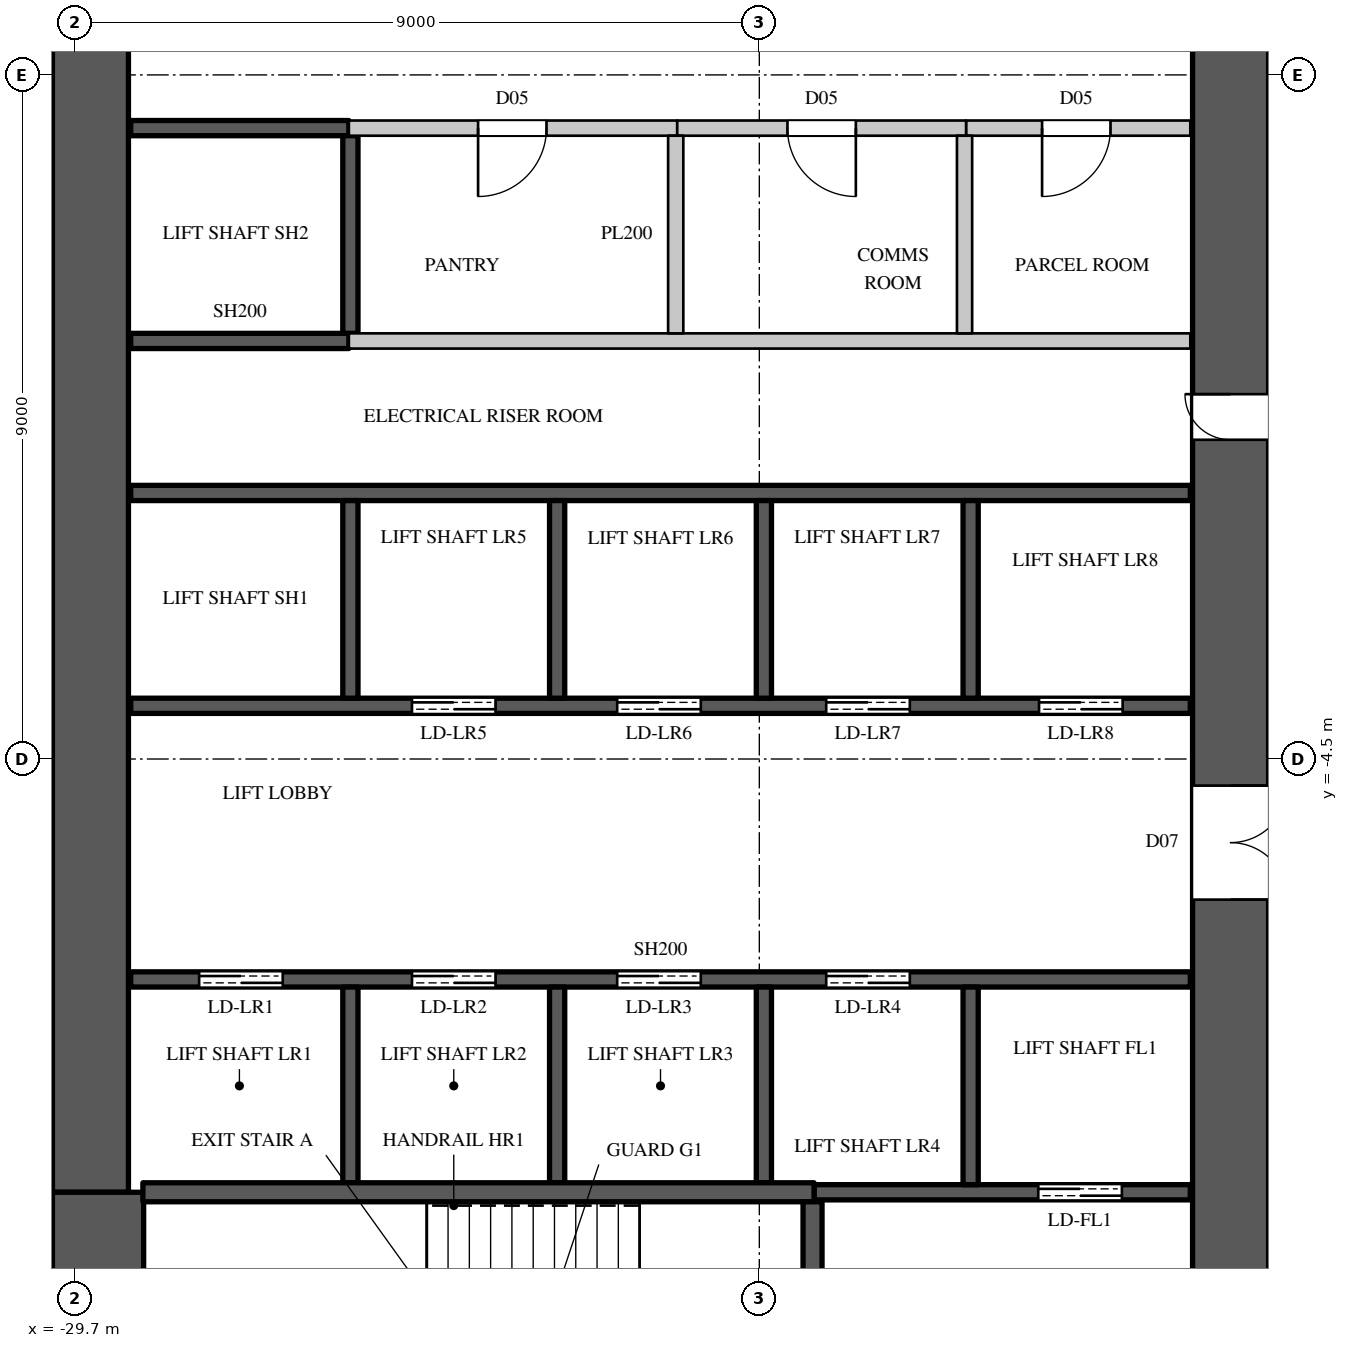
"""IFC4 building model, lengths in metres.
Left out: names, types, materials, properties, quantities, classifications, styles, units other than length and angle.
Written with IfcOpenShell. Run it as: python <this file> out.ifc"""

import sys

from ifc_helpers import new_model, si_unit, direction, frame, frame_2d, origin, place, context, subcontext, project, spatial, rectangle, extrude, element, fill, save


model = new_model("IFC4")
c1 = context("Model", 3, precision=1e-05, world=origin(), true_north=direction((0.0, 1.0)))
c2 = subcontext(c1, "Body", "Model", "MODEL_VIEW")
j1 = project(units=[si_unit("LENGTHUNIT", "METRE"), si_unit("PLANEANGLEUNIT", "RADIAN")], contexts=[c1])
p1 = place(None, origin())
s1 = spatial("IfcSite", under=j1, at=p1, CompositionType="ELEMENT")
p2 = place(p1, origin())
s2 = spatial("IfcBuilding", under=s1, at=p2, CompositionType="ELEMENT")
p3 = place(p2, frame((0.0, 0.0, 87.9)))
s3 = spatial("IfcBuildingStorey", under=s2, at=p3, CompositionType="ELEMENT", Elevation=87.9)
p4 = place(p3, frame((-14.5, -14.8, 0.0), z_axis=(0.0, 0.0, 1.0), x_axis=(0.0, 1.0, 0.0)))
e1 = element("IfcWall", 1, at=p4, inside=s3, PredefinedType="SHEAR", context=c2, shape_type="SweptSolid", body=[
    extrude(rectangle(XDim=29.6, YDim=1.0, at=frame_2d((14.8, 0.0))), origin(), (0.0, 0.0, 1.0), 3.6),
])
p5 = place(p4, frame((8.45, 0.0, 0.0)))
e2 = element("IfcOpeningElement", 2, at=p5, cuts=e1, PredefinedType="OPENING", context=c2, shape_type="SweptSolid", body=[
    extrude(rectangle(XDim=1.5, YDim=2.4, at=frame_2d((0.75, 1.2))), frame((0.0, 0.51, 0.0), z_axis=(0.0, -1.0, 0.0), x_axis=(1.0, 0.0, 0.0)), (0.0, 0.0, 1.0), 1.02),
])
p6 = place(p4, frame((19.65, 0.0, 0.0)))
e3 = element("IfcOpeningElement", 3, at=p6, cuts=e1, PredefinedType="OPENING", context=c2, shape_type="SweptSolid", body=[
    extrude(rectangle(XDim=1.5, YDim=2.4, at=frame_2d((0.75, 1.2))), frame((0.0, 0.51, 0.0), z_axis=(0.0, -1.0, 0.0), x_axis=(1.0, 0.0, 0.0)), (0.0, 0.0, 1.0), 1.02),
])
p7 = place(p4, frame((14.5, 0.0, 0.0)))
e4 = element("IfcOpeningElement", 4, at=p7, cuts=e1, PredefinedType="OPENING", context=c2, shape_type="SweptSolid", body=[
    extrude(rectangle(XDim=0.6, YDim=2.0, at=frame_2d((0.3, 1.0))), frame((0.0, 0.51, 0.0), z_axis=(0.0, -1.0, 0.0), x_axis=(1.0, 0.0, 0.0)), (0.0, 0.0, 1.0), 1.02),
])
p8 = place(p3, frame((-29.5, -10.2, 0.0), z_axis=(0.0, 0.0, 1.0), x_axis=(0.0, 1.0, 0.0)))
e5 = element("IfcWall", 5, at=p8, inside=s3, PredefinedType="SHEAR", context=c2, shape_type="SweptSolid", body=[
    extrude(rectangle(XDim=20.4, YDim=1.0, at=frame_2d((10.2, 0.0))), origin(), (0.0, 0.0, 1.0), 3.6),
])
p9 = place(p3, frame((-29.4, -14.8, 0.0), z_axis=(0.0, 0.0, 1.0), x_axis=(0.0, 1.0, 0.0)))
e6 = element("IfcWall", 6, at=p9, inside=s3, PredefinedType="SHEAR", context=c2, shape_type="SweptSolid", body=[
    extrude(rectangle(XDim=4.6, YDim=1.2, at=frame_2d((2.3, 0.0))), origin(), (0.0, 0.0, 1.0), 3.6),
])
p10 = place(p3, frame((-26.1, 3.8, 0.0), z_axis=(0.0, 0.0, 1.0), x_axis=(1.0, 0.0, 0.0)))
e7 = element("IfcWall", 7, at=p10, inside=s3, PredefinedType="PARTITIONING", context=c2, shape_type="SweptSolid", body=[
    extrude(rectangle(XDim=4.32, YDim=0.2, at=frame_2d((2.16, 0.0))), origin(), (0.0, 0.0, 1.0), 3.3),
])
p11 = place(p10, frame((1.7, 0.0, 0.0)))
e8 = element("IfcOpeningElement", 8, at=p11, cuts=e7, PredefinedType="OPENING", context=c2, shape_type="SweptSolid", body=[
    extrude(rectangle(XDim=0.9, YDim=2.2, at=frame_2d((0.45, 1.1))), frame((0.0, 0.11, 0.0), z_axis=(0.0, -1.0, 0.0), x_axis=(1.0, 0.0, 0.0)), (0.0, 0.0, 1.0), 0.22),
])
p12 = place(p3, frame((-17.98, 3.8, 0.0), z_axis=(0.0, 0.0, 1.0), x_axis=(1.0, 0.0, 0.0)))
e9 = element("IfcWall", 9, at=p12, inside=s3, PredefinedType="PARTITIONING", context=c2, shape_type="SweptSolid", body=[
    extrude(rectangle(XDim=2.95, YDim=0.2, at=frame_2d((1.475, 0.0))), origin(), (0.0, 0.0, 1.0), 3.3),
])
p13 = place(p12, frame((1.0, 0.0, 0.0)))
e10 = element("IfcOpeningElement", 10, at=p13, cuts=e9, PredefinedType="OPENING", context=c2, shape_type="SweptSolid", body=[
    extrude(rectangle(XDim=0.9, YDim=2.2, at=frame_2d((0.45, 1.1))), frame((0.0, 0.11, 0.0), z_axis=(0.0, -1.0, 0.0), x_axis=(1.0, 0.0, 0.0)), (0.0, 0.0, 1.0), 0.22),
])
p14 = place(p3, frame((-26.1, 1.0, 0.0), z_axis=(0.0, 0.0, 1.0), x_axis=(1.0, 0.0, 0.0)))
e11 = element("IfcWall", 11, at=p14, inside=s3, PredefinedType="PARTITIONING", context=c2, shape_type="SweptSolid", body=[
    extrude(rectangle(XDim=11.07, YDim=0.2, at=frame_2d((5.535, 0.0))), origin(), (0.0, 0.0, 1.0), 3.3),
])
p15 = place(p3, frame((-21.78, 3.8, 0.0), z_axis=(0.0, 0.0, 1.0), x_axis=(1.0, 0.0, 0.0)))
e12 = element("IfcWall", 12, at=p15, inside=s3, PredefinedType="PARTITIONING", context=c2, shape_type="SweptSolid", body=[
    extrude(rectangle(XDim=3.8, YDim=0.2, at=frame_2d((1.9, 0.0))), origin(), (0.0, 0.0, 1.0), 3.3),
])
p16 = place(p15, frame((1.45, 0.0, 0.0)))
e13 = element("IfcOpeningElement", 13, at=p16, cuts=e12, PredefinedType="OPENING", context=c2, shape_type="SweptSolid", body=[
    extrude(rectangle(XDim=0.9, YDim=2.2, at=frame_2d((0.45, 1.1))), frame((0.0, 0.11, 0.0), z_axis=(0.0, -1.0, 0.0), x_axis=(1.0, 0.0, 0.0)), (0.0, 0.0, 1.0), 0.22),
])
for number, where, z_axis, x_axis in (
    (14, (-21.8, 1.1, 0.0), (0.0, 0.0, 1.0), (0.0, 1.0, 0.0)),
    (15, (-18.0, 1.1, 0.0), (0.0, 0.0, 1.0), (0.0, 1.0, 0.0)),
):
    element("IfcWall", number, at=place(p3, frame(where, z_axis=z_axis, x_axis=x_axis)), inside=s3, PredefinedType="PARTITIONING", context=c2, shape_type="SweptSolid", body=[
        extrude(rectangle(XDim=2.6, YDim=0.2, at=frame_2d((1.3, 0.0))), origin(), (0.0, 0.0, 1.0), 3.3),
    ])
p17 = place(p3, frame((-28.97, -7.4, 0.0), z_axis=(0.0, 0.0, 1.0), x_axis=(1.0, 0.0, 0.0)))
e16 = element("IfcWall", 16, at=p17, inside=s3, PredefinedType="SHEAR", context=c2, shape_type="SweptSolid", body=[
    extrude(rectangle(XDim=13.94, YDim=0.2, at=frame_2d((6.97, 0.0))), origin(), (0.0, 0.0, 1.0), 3.3),
])
p18 = place(p17, frame((0.9, 0.0, 0.0)))
e17 = element("IfcOpeningElement", 17, at=p18, cuts=e16, PredefinedType="OPENING", context=c2, shape_type="SweptSolid", body=[
    extrude(rectangle(XDim=1.1, YDim=2.2, at=frame_2d((0.55, 1.1))), frame((0.0, 0.11, 0.0), z_axis=(0.0, -1.0, 0.0), x_axis=(1.0, 0.0, 0.0)), (0.0, 0.0, 1.0), 0.22),
])
p19 = place(p17, frame((3.7, 0.0, 0.0)))
e18 = element("IfcOpeningElement", 18, at=p19, cuts=e16, PredefinedType="OPENING", context=c2, shape_type="SweptSolid", body=[
    extrude(rectangle(XDim=1.1, YDim=2.2, at=frame_2d((0.55, 1.1))), frame((0.0, 0.11, 0.0), z_axis=(0.0, -1.0, 0.0), x_axis=(1.0, 0.0, 0.0)), (0.0, 0.0, 1.0), 0.22),
])
p20 = place(p17, frame((6.4, 0.0, 0.0)))
e19 = element("IfcOpeningElement", 19, at=p20, cuts=e16, PredefinedType="OPENING", context=c2, shape_type="SweptSolid", body=[
    extrude(rectangle(XDim=1.1, YDim=2.2, at=frame_2d((0.55, 1.1))), frame((0.0, 0.11, 0.0), z_axis=(0.0, -1.0, 0.0), x_axis=(1.0, 0.0, 0.0)), (0.0, 0.0, 1.0), 0.22),
])
p21 = place(p17, frame((9.15, 0.0, 0.0)))
e20 = element("IfcOpeningElement", 20, at=p21, cuts=e16, PredefinedType="OPENING", context=c2, shape_type="SweptSolid", body=[
    extrude(rectangle(XDim=1.1, YDim=2.2, at=frame_2d((0.55, 1.1))), frame((0.0, 0.11, 0.0), z_axis=(0.0, -1.0, 0.0), x_axis=(1.0, 0.0, 0.0)), (0.0, 0.0, 1.0), 0.22),
])
p22 = place(p3, frame((-28.97, -3.8, 0.0), z_axis=(0.0, 0.0, 1.0), x_axis=(1.0, 0.0, 0.0)))
e21 = element("IfcWall", 21, at=p22, inside=s3, PredefinedType="SHEAR", context=c2, shape_type="SweptSolid", body=[
    extrude(rectangle(XDim=13.94, YDim=0.2, at=frame_2d((6.97, 0.0))), origin(), (0.0, 0.0, 1.0), 3.3),
])
p23 = place(p22, frame((3.7, 0.0, 0.0)))
e22 = element("IfcOpeningElement", 22, at=p23, cuts=e21, PredefinedType="OPENING", context=c2, shape_type="SweptSolid", body=[
    extrude(rectangle(XDim=1.1, YDim=2.2, at=frame_2d((0.55, 1.1))), frame((0.0, 0.11, 0.0), z_axis=(0.0, -1.0, 0.0), x_axis=(1.0, 0.0, 0.0)), (0.0, 0.0, 1.0), 0.22),
])
p24 = place(p22, frame((6.4, 0.0, 0.0)))
e23 = element("IfcOpeningElement", 23, at=p24, cuts=e21, PredefinedType="OPENING", context=c2, shape_type="SweptSolid", body=[
    extrude(rectangle(XDim=1.1, YDim=2.2, at=frame_2d((0.55, 1.1))), frame((0.0, 0.11, 0.0), z_axis=(0.0, -1.0, 0.0), x_axis=(1.0, 0.0, 0.0)), (0.0, 0.0, 1.0), 0.22),
])
p25 = place(p22, frame((9.15, 0.0, 0.0)))
e24 = element("IfcOpeningElement", 24, at=p25, cuts=e21, PredefinedType="OPENING", context=c2, shape_type="SweptSolid", body=[
    extrude(rectangle(XDim=1.1, YDim=2.2, at=frame_2d((0.55, 1.1))), frame((0.0, 0.11, 0.0), z_axis=(0.0, -1.0, 0.0), x_axis=(1.0, 0.0, 0.0)), (0.0, 0.0, 1.0), 0.22),
])
p26 = place(p22, frame((11.95, 0.0, 0.0)))
e25 = element("IfcOpeningElement", 25, at=p26, cuts=e21, PredefinedType="OPENING", context=c2, shape_type="SweptSolid", body=[
    extrude(rectangle(XDim=1.1, YDim=2.2, at=frame_2d((0.55, 1.1))), frame((0.0, 0.11, 0.0), z_axis=(0.0, -1.0, 0.0), x_axis=(1.0, 0.0, 0.0)), (0.0, 0.0, 1.0), 0.22),
])
p27 = place(p3, frame((-28.97, -1.0, 0.0), z_axis=(0.0, 0.0, 1.0), x_axis=(1.0, 0.0, 0.0)))
e26 = element("IfcWall", 26, at=p27, inside=s3, PredefinedType="SHEAR", context=c2, shape_type="SweptSolid", body=[
    extrude(rectangle(XDim=13.94, YDim=0.2, at=frame_2d((6.97, 0.0))), origin(), (0.0, 0.0, 1.0), 3.3),
])
for number, where, z_axis, x_axis in (
    (27, (-28.97, 1.0, 0.0), (0.0, 0.0, 1.0), (1.0, 0.0, 0.0)),
    (28, (-28.97, 3.8, 0.0), (0.0, 0.0, 1.0), (1.0, 0.0, 0.0)),
):
    element("IfcWall", number, at=place(p3, frame(where, z_axis=z_axis, x_axis=x_axis)), inside=s3, PredefinedType="SHEAR", context=c2, shape_type="SweptSolid", body=[
        extrude(rectangle(XDim=2.87, YDim=0.2, at=frame_2d((1.435, 0.0))), origin(), (0.0, 0.0, 1.0), 3.3),
    ])
p28 = place(p3, frame((-26.08, -10.075, 0.0), z_axis=(0.0, 0.0, 1.0), x_axis=(0.0, 1.0, 0.0)))
e29 = element("IfcWall", 29, at=p28, inside=s3, PredefinedType="SHEAR", context=c2, shape_type="SweptSolid", body=[
    extrude(rectangle(XDim=2.575, YDim=0.2, at=frame_2d((1.288, 0.0))), origin(), (0.0, 0.0, 1.0), 3.6),
])
p29 = place(p3, frame((-26.08, -3.7, 0.0), z_axis=(0.0, 0.0, 1.0), x_axis=(0.0, 1.0, 0.0)))
e30 = element("IfcWall", 30, at=p29, inside=s3, PredefinedType="SHEAR", context=c2, shape_type="SweptSolid", body=[
    extrude(rectangle(XDim=2.6, YDim=0.2, at=frame_2d((1.3, 0.0))), origin(), (0.0, 0.0, 1.0), 3.6),
])
p30 = place(p3, frame((-26.08, 1.1, 0.0), z_axis=(0.0, 0.0, 1.0), x_axis=(0.0, 1.0, 0.0)))
e31 = element("IfcWall", 31, at=p30, inside=s3, PredefinedType="SHEAR", context=c2, shape_type="SweptSolid", body=[
    extrude(rectangle(XDim=2.6, YDim=0.2, at=frame_2d((1.3, 0.0))), origin(), (0.0, 0.0, 1.0), 3.3),
])
p31 = place(p3, frame((-23.36, -10.075, 0.0), z_axis=(0.0, 0.0, 1.0), x_axis=(0.0, 1.0, 0.0)))
e32 = element("IfcWall", 32, at=p31, inside=s3, PredefinedType="SHEAR", context=c2, shape_type="SweptSolid", body=[
    extrude(rectangle(XDim=2.575, YDim=0.2, at=frame_2d((1.288, 0.0))), origin(), (0.0, 0.0, 1.0), 3.6),
])
p32 = place(p3, frame((-23.36, -3.7, 0.0), z_axis=(0.0, 0.0, 1.0), x_axis=(0.0, 1.0, 0.0)))
e33 = element("IfcWall", 33, at=p32, inside=s3, PredefinedType="SHEAR", context=c2, shape_type="SweptSolid", body=[
    extrude(rectangle(XDim=2.6, YDim=0.2, at=frame_2d((1.3, 0.0))), origin(), (0.0, 0.0, 1.0), 3.6),
])
p33 = place(p3, frame((-20.64, -10.075, 0.0), z_axis=(0.0, 0.0, 1.0), x_axis=(0.0, 1.0, 0.0)))
e34 = element("IfcWall", 34, at=p33, inside=s3, PredefinedType="SHEAR", context=c2, shape_type="SweptSolid", body=[
    extrude(rectangle(XDim=2.575, YDim=0.2, at=frame_2d((1.288, 0.0))), origin(), (0.0, 0.0, 1.0), 3.6),
])
p34 = place(p3, frame((-20.64, -3.7, 0.0), z_axis=(0.0, 0.0, 1.0), x_axis=(0.0, 1.0, 0.0)))
e35 = element("IfcWall", 35, at=p34, inside=s3, PredefinedType="SHEAR", context=c2, shape_type="SweptSolid", body=[
    extrude(rectangle(XDim=2.6, YDim=0.2, at=frame_2d((1.3, 0.0))), origin(), (0.0, 0.0, 1.0), 3.6),
])
p35 = place(p3, frame((-19.98, -10.2, 0.0), z_axis=(0.0, 0.0, 1.0), x_axis=(1.0, 0.0, 0.0)))
e36 = element("IfcWall", 36, at=p35, inside=s3, PredefinedType="SHEAR", context=c2, shape_type="SweptSolid", body=[
    extrude(rectangle(XDim=4.95, YDim=0.2, at=frame_2d((2.475, 0.0))), origin(), (0.0, 0.0, 1.0), 3.3),
])
p36 = place(p35, frame((2.95, 0.0, 0.0)))
e37 = element("IfcOpeningElement", 37, at=p36, cuts=e36, PredefinedType="OPENING", context=c2, shape_type="SweptSolid", body=[
    extrude(rectangle(XDim=1.1, YDim=2.2, at=frame_2d((0.55, 1.1))), frame((0.0, 0.11, 0.0), z_axis=(0.0, -1.0, 0.0), x_axis=(1.0, 0.0, 0.0)), (0.0, 0.0, 1.0), 0.22),
])
p37 = place(p3, frame((-17.92, -10.1, 0.0), z_axis=(0.0, 0.0, 1.0), x_axis=(0.0, 1.0, 0.0)))
e38 = element("IfcWall", 38, at=p37, inside=s3, PredefinedType="SHEAR", context=c2, shape_type="SweptSolid", body=[
    extrude(rectangle(XDim=2.6, YDim=0.2, at=frame_2d((1.3, 0.0))), origin(), (0.0, 0.0, 1.0), 3.6),
])
p38 = place(p3, frame((-17.92, -3.7, 0.0), z_axis=(0.0, 0.0, 1.0), x_axis=(0.0, 1.0, 0.0)))
e39 = element("IfcWall", 39, at=p38, inside=s3, PredefinedType="SHEAR", context=c2, shape_type="SweptSolid", body=[
    extrude(rectangle(XDim=2.6, YDim=0.2, at=frame_2d((1.3, 0.0))), origin(), (0.0, 0.0, 1.0), 3.6),
])
p39 = place(p3, frame((-28.81, -10.2, 0.0), z_axis=(0.0, 0.0, 1.0), x_axis=(1.0, 0.0, 0.0)))
e40 = element("IfcWall", 40, at=p39, inside=s3, PredefinedType="SHEAR", context=c2, shape_type="SweptSolid", body=[
    extrude(rectangle(XDim=8.83, YDim=0.25, at=frame_2d((4.415, 0.0))), origin(), (0.0, 0.0, 1.0), 3.3),
])
p40 = place(p3, frame((-20.0, -14.77, 0.0), z_axis=(0.0, 0.0, 1.0), x_axis=(0.0, 1.0, 0.0)))
e41 = element("IfcWall", 41, at=p40, inside=s3, PredefinedType="SHEAR", context=c2, shape_type="SweptSolid", body=[
    extrude(rectangle(XDim=4.445, YDim=0.25, at=frame_2d((2.223, 0.0))), origin(), (0.0, 0.0, 1.0), 3.3),
])
p41 = place(p40, frame((1.7, 0.0, 0.0)))
e42 = element("IfcOpeningElement", 42, at=p41, cuts=e41, PredefinedType="OPENING", context=c2, shape_type="SweptSolid", body=[
    extrude(rectangle(XDim=1.1, YDim=2.2, at=frame_2d((0.55, 1.1))), frame((0.0, 0.135, 0.0), z_axis=(0.0, -1.0, 0.0), x_axis=(1.0, 0.0, 0.0)), (0.0, 0.0, 1.0), 0.27),
])
p42 = place(p11, origin())
e43 = element("IfcDoor", 43, at=p42, inside=s3, OperationType="SINGLE_SWING_RIGHT", PredefinedType="DOOR", context=c2, shape_type="SweptSolid", body=[
    extrude(rectangle(XDim=0.9, YDim=2.2, at=frame_2d((0.45, 1.1))), frame((0.0, 0.025, 0.0), z_axis=(0.0, -1.0, 0.0), x_axis=(1.0, 0.0, 0.0)), (0.0, 0.0, 1.0), 0.05),
])
fill(e8, e43)
p43 = place(p16, origin())
e44 = element("IfcDoor", 44, at=p43, inside=s3, OperationType="SINGLE_SWING_LEFT", PredefinedType="DOOR", context=c2, shape_type="SweptSolid", body=[
    extrude(rectangle(XDim=0.9, YDim=2.2, at=frame_2d((0.45, 1.1))), frame((0.0, 0.025, 0.0), z_axis=(0.0, -1.0, 0.0), x_axis=(1.0, 0.0, 0.0)), (0.0, 0.0, 1.0), 0.05),
])
fill(e13, e44)
p44 = place(p13, origin())
e45 = element("IfcDoor", 45, at=p44, inside=s3, OperationType="SINGLE_SWING_RIGHT", PredefinedType="DOOR", context=c2, shape_type="SweptSolid", body=[
    extrude(rectangle(XDim=0.9, YDim=2.2, at=frame_2d((0.45, 1.1))), frame((0.0, 0.025, 0.0), z_axis=(0.0, -1.0, 0.0), x_axis=(1.0, 0.0, 0.0)), (0.0, 0.0, 1.0), 0.05),
])
fill(e10, e45)
p45 = place(p18, origin())
e46 = element("IfcDoor", 46, at=p45, inside=s3, OperationType="DOUBLE_DOOR_SLIDING", PredefinedType="DOOR", context=c2, shape_type="SweptSolid", body=[
    extrude(rectangle(XDim=1.1, YDim=2.2, at=frame_2d((0.55, 1.1))), frame((0.0, 0.025, 0.0), z_axis=(0.0, -1.0, 0.0), x_axis=(1.0, 0.0, 0.0)), (0.0, 0.0, 1.0), 0.05),
])
fill(e17, e46)
p46 = place(p19, origin())
e47 = element("IfcDoor", 47, at=p46, inside=s3, OperationType="DOUBLE_DOOR_SLIDING", PredefinedType="DOOR", context=c2, shape_type="SweptSolid", body=[
    extrude(rectangle(XDim=1.1, YDim=2.2, at=frame_2d((0.55, 1.1))), frame((0.0, 0.025, 0.0), z_axis=(0.0, -1.0, 0.0), x_axis=(1.0, 0.0, 0.0)), (0.0, 0.0, 1.0), 0.05),
])
fill(e18, e47)
p47 = place(p20, origin())
e48 = element("IfcDoor", 48, at=p47, inside=s3, OperationType="DOUBLE_DOOR_SLIDING", PredefinedType="DOOR", context=c2, shape_type="SweptSolid", body=[
    extrude(rectangle(XDim=1.1, YDim=2.2, at=frame_2d((0.55, 1.1))), frame((0.0, 0.025, 0.0), z_axis=(0.0, -1.0, 0.0), x_axis=(1.0, 0.0, 0.0)), (0.0, 0.0, 1.0), 0.05),
])
fill(e19, e48)
p48 = place(p21, origin())
e49 = element("IfcDoor", 49, at=p48, inside=s3, OperationType="DOUBLE_DOOR_SLIDING", PredefinedType="DOOR", context=c2, shape_type="SweptSolid", body=[
    extrude(rectangle(XDim=1.1, YDim=2.2, at=frame_2d((0.55, 1.1))), frame((0.0, 0.025, 0.0), z_axis=(0.0, -1.0, 0.0), x_axis=(1.0, 0.0, 0.0)), (0.0, 0.0, 1.0), 0.05),
])
fill(e20, e49)
p49 = place(p36, origin())
e50 = element("IfcDoor", 50, at=p49, inside=s3, OperationType="DOUBLE_DOOR_SLIDING", PredefinedType="DOOR", context=c2, shape_type="SweptSolid", body=[
    extrude(rectangle(XDim=1.1, YDim=2.2, at=frame_2d((0.55, 1.1))), frame((0.0, 0.025, 0.0), z_axis=(0.0, -1.0, 0.0), x_axis=(1.0, 0.0, 0.0)), (0.0, 0.0, 1.0), 0.05),
])
fill(e37, e50)
p50 = place(p23, origin())
e51 = element("IfcDoor", 51, at=p50, inside=s3, OperationType="DOUBLE_DOOR_SLIDING", PredefinedType="DOOR", context=c2, shape_type="SweptSolid", body=[
    extrude(rectangle(XDim=1.1, YDim=2.2, at=frame_2d((0.55, 1.1))), frame((0.0, 0.025, 0.0), z_axis=(0.0, -1.0, 0.0), x_axis=(1.0, 0.0, 0.0)), (0.0, 0.0, 1.0), 0.05),
])
fill(e22, e51)
p51 = place(p24, origin())
e52 = element("IfcDoor", 52, at=p51, inside=s3, OperationType="DOUBLE_DOOR_SLIDING", PredefinedType="DOOR", context=c2, shape_type="SweptSolid", body=[
    extrude(rectangle(XDim=1.1, YDim=2.2, at=frame_2d((0.55, 1.1))), frame((0.0, 0.025, 0.0), z_axis=(0.0, -1.0, 0.0), x_axis=(1.0, 0.0, 0.0)), (0.0, 0.0, 1.0), 0.05),
])
fill(e23, e52)
p52 = place(p25, origin())
e53 = element("IfcDoor", 53, at=p52, inside=s3, OperationType="DOUBLE_DOOR_SLIDING", PredefinedType="DOOR", context=c2, shape_type="SweptSolid", body=[
    extrude(rectangle(XDim=1.1, YDim=2.2, at=frame_2d((0.55, 1.1))), frame((0.0, 0.025, 0.0), z_axis=(0.0, -1.0, 0.0), x_axis=(1.0, 0.0, 0.0)), (0.0, 0.0, 1.0), 0.05),
])
fill(e24, e53)
p53 = place(p26, origin())
e54 = element("IfcDoor", 54, at=p53, inside=s3, OperationType="DOUBLE_DOOR_SLIDING", PredefinedType="DOOR", context=c2, shape_type="SweptSolid", body=[
    extrude(rectangle(XDim=1.1, YDim=2.2, at=frame_2d((0.55, 1.1))), frame((0.0, 0.025, 0.0), z_axis=(0.0, -1.0, 0.0), x_axis=(1.0, 0.0, 0.0)), (0.0, 0.0, 1.0), 0.05),
])
fill(e25, e54)
p54 = place(p5, origin())
e55 = element("IfcDoor", 55, at=p54, inside=s3, OperationType="DOUBLE_DOOR_SINGLE_SWING", PredefinedType="DOOR", context=c2, shape_type="SweptSolid", body=[
    extrude(rectangle(XDim=1.5, YDim=2.4, at=frame_2d((0.75, 1.2))), frame((0.0, -0.445, 0.0), z_axis=(0.0, -1.0, 0.0), x_axis=(1.0, 0.0, 0.0)), (0.0, 0.0, 1.0), 0.05),
])
fill(e2, e55)
p55 = place(p7, origin())
e56 = element("IfcDoor", 56, at=p55, inside=s3, OperationType="SINGLE_SWING_RIGHT", PredefinedType="DOOR", context=c2, shape_type="SweptSolid", body=[
    extrude(rectangle(XDim=0.6, YDim=2.0, at=frame_2d((0.3, 1.0))), frame((0.0, 0.495, 0.0), z_axis=(0.0, -1.0, 0.0), x_axis=(1.0, 0.0, 0.0)), (0.0, 0.0, 1.0), 0.05),
])
fill(e4, e56)
save(model, sys.argv[1])
